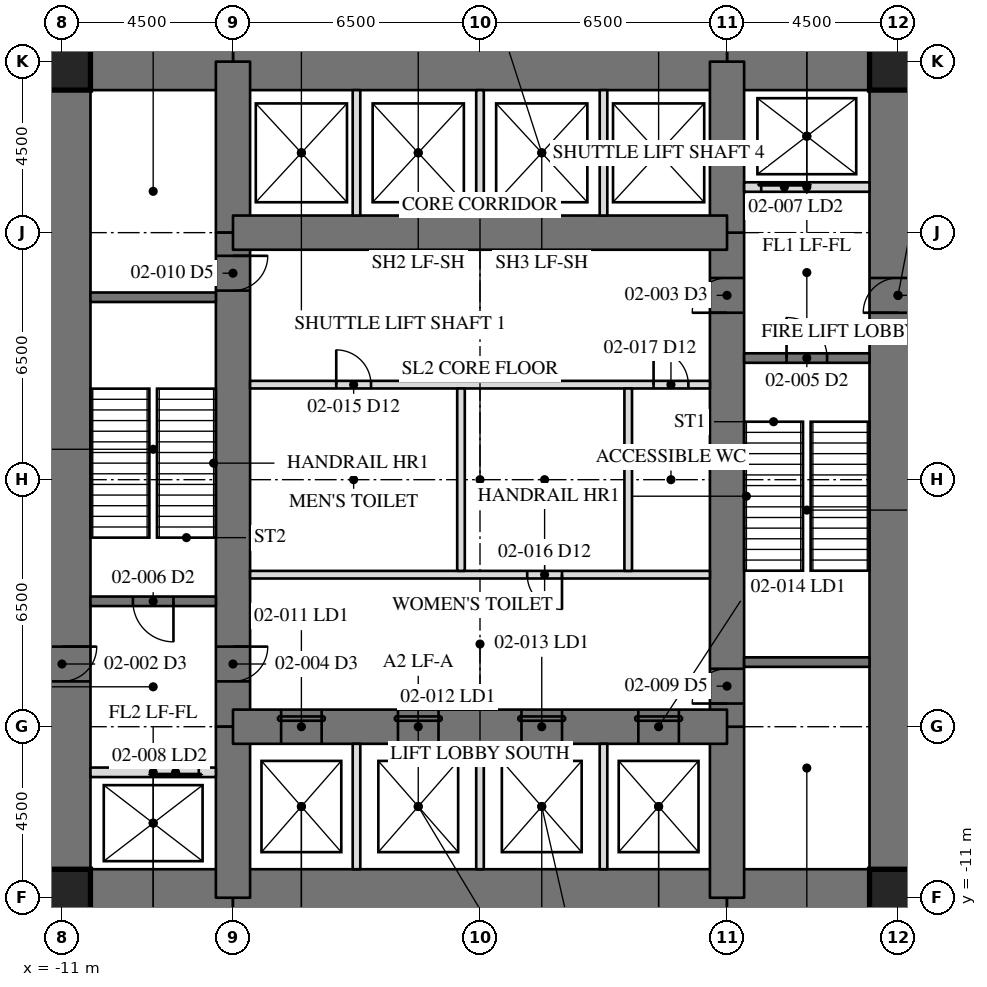
"""IFC4 building model, lengths in metres.
Left out: names, types, materials, properties, quantities, classifications, styles, units other than length and angle.
Written with IfcOpenShell. Run it as: python <this file> out.ifc"""

import sys

from ifc_helpers import new_model, si_unit, direction, frame, frame_2d, origin, origin_2d, place, context, subcontext, project, spatial, rectangle, hollow_rectangle, extrude, element, fill, save


model = new_model("IFC4")
c1 = context("Model", 3, precision=1e-05, world=origin(), true_north=direction((0.0, 1.0)))
c2 = subcontext(c1, "Body", "Model", "MODEL_VIEW")
j1 = project(units=[si_unit("LENGTHUNIT", "METRE"), si_unit("PLANEANGLEUNIT", "RADIAN")], contexts=[c1])
p1 = place(None, origin())
s1 = spatial("IfcSite", under=j1, at=p1, CompositionType="ELEMENT")
p2 = place(p1, origin())
s2 = spatial("IfcBuilding", under=s1, at=p2, CompositionType="ELEMENT")
p3 = place(p2, frame((0.0, 0.0, 11.0)))
s3 = spatial("IfcBuildingStorey", under=s2, at=p3, CompositionType="ELEMENT", Elevation=11.0)
p4 = place(p3, frame((11.0, -11.0, 0.0), z_axis=(0.0, 0.0, 1.0), x_axis=(0.0, 1.0, 0.0)))
e1 = element("IfcWall", 1, at=p4, inside=s3, PredefinedType="SHEAR", context=c2, shape_type="SweptSolid", body=[
    extrude(rectangle(XDim=22.0, YDim=1.5, at=frame_2d((11.0, 0.0))), origin(), (0.0, 0.0, 1.0), 5.0),
])
p5 = place(p4, frame((15.393, 0.0, 0.0)))
e2 = element("IfcOpeningElement", 2, at=p5, cuts=e1, PredefinedType="OPENING", context=c2, shape_type="SweptSolid", body=[
    extrude(rectangle(XDim=0.915, YDim=2.134, at=frame_2d((0.458, 1.067))), frame((0.0, 0.76, 0.0), z_axis=(0.0, -1.0, 0.0), x_axis=(1.0, 0.0, 0.0)), (0.0, 0.0, 1.0), 1.52),
])
p6 = place(p3, frame((-11.0, 11.0, 0.0), z_axis=(0.0, 0.0, 1.0), x_axis=(0.0, -1.0, 0.0)))
e3 = element("IfcWall", 3, at=p6, inside=s3, PredefinedType="SHEAR", context=c2, shape_type="SweptSolid", body=[
    extrude(rectangle(XDim=22.0, YDim=1.5, at=frame_2d((11.0, 0.0))), origin(), (0.0, 0.0, 1.0), 5.0),
])
p7 = place(p6, frame((15.393, 0.0, 0.0)))
e4 = element("IfcOpeningElement", 4, at=p7, cuts=e3, PredefinedType="OPENING", context=c2, shape_type="SweptSolid", body=[
    extrude(rectangle(XDim=0.915, YDim=2.134, at=frame_2d((0.458, 1.067))), frame((0.0, 0.76, 0.0), z_axis=(0.0, -1.0, 0.0), x_axis=(1.0, 0.0, 0.0)), (0.0, 0.0, 1.0), 1.52),
])
p8 = place(p3, frame((11.0, 11.0, 0.0), z_axis=(0.0, 0.0, 1.0), x_axis=(-1.0, 0.0, 0.0)))
e5 = element("IfcWall", 5, at=p8, inside=s3, PredefinedType="SHEAR", context=c2, shape_type="SweptSolid", body=[
    extrude(rectangle(XDim=4.5, YDim=1.5, at=frame_2d((2.25, 0.0))), origin(), (0.0, 0.0, 1.0), 5.0),
])
p9 = place(p3, frame((6.5, 11.0, 0.0), z_axis=(0.0, 0.0, 1.0), x_axis=(-1.0, 0.0, 0.0)))
e6 = element("IfcWall", 6, at=p9, inside=s3, PredefinedType="SHEAR", context=c2, shape_type="SweptSolid", body=[
    extrude(rectangle(XDim=13.0, YDim=1.5, at=frame_2d((6.5, 0.0))), origin(), (0.0, 0.0, 1.0), 5.0),
])
for number, where, z_axis, x_axis in (
    (7, (-6.5, 11.0, 0.0), (0.0, 0.0, 1.0), (-1.0, 0.0, 0.0)),
    (8, (-11.0, -11.0, 0.0), (0.0, 0.0, 1.0), (1.0, 0.0, 0.0)),
):
    element("IfcWall", number, at=place(p3, frame(where, z_axis=z_axis, x_axis=x_axis)), inside=s3, PredefinedType="SHEAR", context=c2, shape_type="SweptSolid", body=[
        extrude(rectangle(XDim=4.5, YDim=1.5, at=frame_2d((2.25, 0.0))), origin(), (0.0, 0.0, 1.0), 5.0),
    ])
p10 = place(p3, frame((-6.5, -11.0, 0.0), z_axis=(0.0, 0.0, 1.0), x_axis=(1.0, 0.0, 0.0)))
e9 = element("IfcWall", 9, at=p10, inside=s3, PredefinedType="SHEAR", context=c2, shape_type="SweptSolid", body=[
    extrude(rectangle(XDim=13.0, YDim=1.5, at=frame_2d((6.5, 0.0))), origin(), (0.0, 0.0, 1.0), 5.0),
])
p11 = place(p3, frame((6.5, -11.0, 0.0), z_axis=(0.0, 0.0, 1.0), x_axis=(1.0, 0.0, 0.0)))
e10 = element("IfcWall", 10, at=p11, inside=s3, PredefinedType="SHEAR", context=c2, shape_type="SweptSolid", body=[
    extrude(rectangle(XDim=4.5, YDim=1.5, at=frame_2d((2.25, 0.0))), origin(), (0.0, 0.0, 1.0), 5.0),
])
p12 = place(p3, frame((6.5, -11.0, 0.0), z_axis=(0.0, 0.0, 1.0), x_axis=(0.0, 1.0, 0.0)))
e11 = element("IfcWall", 11, at=p12, inside=s3, PredefinedType="SHEAR", context=c2, shape_type="SweptSolid", body=[
    extrude(rectangle(XDim=4.5, YDim=0.9, at=frame_2d((2.25, 0.0))), origin(), (0.0, 0.0, 1.0), 5.0),
])
p13 = place(p3, frame((6.5, -6.5, 0.0), z_axis=(0.0, 0.0, 1.0), x_axis=(0.0, 1.0, 0.0)))
e12 = element("IfcWall", 12, at=p13, inside=s3, PredefinedType="SHEAR", context=c2, shape_type="SweptSolid", body=[
    extrude(rectangle(XDim=13.0, YDim=0.9, at=frame_2d((6.5, 0.0))), origin(), (0.0, 0.0, 1.0), 5.0),
])
p14 = place(p13, frame((10.893, 0.0, 0.0)))
e13 = element("IfcOpeningElement", 13, at=p14, cuts=e12, PredefinedType="OPENING", context=c2, shape_type="SweptSolid", body=[
    extrude(rectangle(XDim=0.915, YDim=2.134, at=frame_2d((0.458, 1.067))), frame((0.0, 0.46, 0.0), z_axis=(0.0, -1.0, 0.0), x_axis=(1.0, 0.0, 0.0)), (0.0, 0.0, 1.0), 0.92),
])
p15 = place(p13, frame((0.61, 0.0, 0.0)))
e14 = element("IfcOpeningElement", 14, at=p15, cuts=e12, PredefinedType="OPENING", context=c2, shape_type="SweptSolid", body=[
    extrude(rectangle(XDim=0.915, YDim=2.134, at=frame_2d((0.458, 1.067))), frame((0.0, 0.46, 0.0), z_axis=(0.0, -1.0, 0.0), x_axis=(1.0, 0.0, 0.0)), (0.0, 0.0, 1.0), 0.92),
])
for number, where, z_axis, x_axis in (
    (15, (6.5, 6.5, 0.0), (0.0, 0.0, 1.0), (0.0, 1.0, 0.0)),
    (16, (-6.5, 11.0, 0.0), (0.0, 0.0, 1.0), (0.0, -1.0, 0.0)),
):
    element("IfcWall", number, at=place(p3, frame(where, z_axis=z_axis, x_axis=x_axis)), inside=s3, PredefinedType="SHEAR", context=c2, shape_type="SweptSolid", body=[
        extrude(rectangle(XDim=4.5, YDim=0.9, at=frame_2d((2.25, 0.0))), origin(), (0.0, 0.0, 1.0), 5.0),
    ])
p16 = place(p3, frame((-6.5, 6.5, 0.0), z_axis=(0.0, 0.0, 1.0), x_axis=(0.0, -1.0, 0.0)))
e17 = element("IfcWall", 17, at=p16, inside=s3, PredefinedType="SHEAR", context=c2, shape_type="SweptSolid", body=[
    extrude(rectangle(XDim=13.0, YDim=0.9, at=frame_2d((6.5, 0.0))), origin(), (0.0, 0.0, 1.0), 5.0),
])
p17 = place(p16, frame((10.893, 0.0, 0.0)))
e18 = element("IfcOpeningElement", 18, at=p17, cuts=e17, PredefinedType="OPENING", context=c2, shape_type="SweptSolid", body=[
    extrude(rectangle(XDim=0.915, YDim=2.134, at=frame_2d((0.458, 1.067))), frame((0.0, 0.46, 0.0), z_axis=(0.0, -1.0, 0.0), x_axis=(1.0, 0.0, 0.0)), (0.0, 0.0, 1.0), 0.92),
])
p18 = place(p16, frame((0.61, 0.0, 0.0)))
e19 = element("IfcOpeningElement", 19, at=p18, cuts=e17, PredefinedType="OPENING", context=c2, shape_type="SweptSolid", body=[
    extrude(rectangle(XDim=0.915, YDim=2.134, at=frame_2d((0.458, 1.067))), frame((0.0, 0.46, 0.0), z_axis=(0.0, -1.0, 0.0), x_axis=(1.0, 0.0, 0.0)), (0.0, 0.0, 1.0), 0.92),
])
p19 = place(p3, frame((-6.5, -6.5, 0.0), z_axis=(0.0, 0.0, 1.0), x_axis=(0.0, -1.0, 0.0)))
e20 = element("IfcWall", 20, at=p19, inside=s3, PredefinedType="SHEAR", context=c2, shape_type="SweptSolid", body=[
    extrude(rectangle(XDim=4.5, YDim=0.9, at=frame_2d((2.25, 0.0))), origin(), (0.0, 0.0, 1.0), 5.0),
])
p20 = place(p3, frame((6.5, 6.5, 0.0), z_axis=(0.0, 0.0, 1.0), x_axis=(-1.0, 0.0, 0.0)))
e21 = element("IfcWall", 21, at=p20, inside=s3, PredefinedType="SHEAR", context=c2, shape_type="SweptSolid", body=[
    extrude(rectangle(XDim=13.0, YDim=0.9, at=frame_2d((6.5, 0.0))), origin(), (0.0, 0.0, 1.0), 5.0),
])
p21 = place(p3, frame((-6.5, -6.5, 0.0), z_axis=(0.0, 0.0, 1.0), x_axis=(1.0, 0.0, 0.0)))
e22 = element("IfcWall", 22, at=p21, inside=s3, PredefinedType="SHEAR", context=c2, shape_type="SweptSolid", body=[
    extrude(rectangle(XDim=13.0, YDim=0.9, at=frame_2d((6.5, 0.0))), origin(), (0.0, 0.0, 1.0), 5.0),
])
p22 = place(p21, frame((1.267, 0.0, 0.0)))
e23 = element("IfcOpeningElement", 23, at=p22, cuts=e22, PredefinedType="OPENING", context=c2, shape_type="SweptSolid", body=[
    extrude(rectangle(XDim=1.067, YDim=2.134, at=frame_2d((0.533, 1.067))), frame((0.0, 0.46, 0.0), z_axis=(0.0, -1.0, 0.0), x_axis=(1.0, 0.0, 0.0)), (0.0, 0.0, 1.0), 0.92),
])
p23 = place(p21, frame((4.342, 0.0, 0.0)))
e24 = element("IfcOpeningElement", 24, at=p23, cuts=e22, PredefinedType="OPENING", context=c2, shape_type="SweptSolid", body=[
    extrude(rectangle(XDim=1.067, YDim=2.134, at=frame_2d((0.533, 1.067))), frame((0.0, 0.46, 0.0), z_axis=(0.0, -1.0, 0.0), x_axis=(1.0, 0.0, 0.0)), (0.0, 0.0, 1.0), 0.92),
])
p24 = place(p21, frame((7.592, 0.0, 0.0)))
e25 = element("IfcOpeningElement", 25, at=p24, cuts=e22, PredefinedType="OPENING", context=c2, shape_type="SweptSolid", body=[
    extrude(rectangle(XDim=1.067, YDim=2.134, at=frame_2d((0.533, 1.067))), frame((0.0, 0.46, 0.0), z_axis=(0.0, -1.0, 0.0), x_axis=(1.0, 0.0, 0.0)), (0.0, 0.0, 1.0), 0.92),
])
p25 = place(p21, frame((10.667, 0.0, 0.0)))
e26 = element("IfcOpeningElement", 26, at=p25, cuts=e22, PredefinedType="OPENING", context=c2, shape_type="SweptSolid", body=[
    extrude(rectangle(XDim=1.067, YDim=2.134, at=frame_2d((0.533, 1.067))), frame((0.0, 0.46, 0.0), z_axis=(0.0, -1.0, 0.0), x_axis=(1.0, 0.0, 0.0)), (0.0, 0.0, 1.0), 0.92),
])
for number, where, z_axis, x_axis in (
    (27, (11.0, 11.0, 0.0), (0.0, 0.0, 1.0), (1.0, 0.0, 0.0)),
    (28, (-11.0, 11.0, 0.0), (0.0, 0.0, 1.0), (1.0, 0.0, 0.0)),
    (29, (-11.0, -11.0, 0.0), (0.0, 0.0, 1.0), (1.0, 0.0, 0.0)),
    (30, (11.0, -11.0, 0.0), (0.0, 0.0, 1.0), (1.0, 0.0, 0.0)),
):
    element("IfcColumn", number, at=place(p3, frame(where, z_axis=z_axis, x_axis=x_axis)), inside=s3, PredefinedType="COLUMN", context=c2, shape_type="SweptSolid", body=[
        extrude(hollow_rectangle(XDim=1.499, YDim=1.499, WallThickness=0.102, at=origin_2d()), origin(), (0.0, 0.0, 1.0), 5.0),
    ])
for number, where, z_axis, x_axis in (
    (31, (6.95, -4.8, 0.0), (0.0, 0.0, 1.0), (1.0, 0.0, 0.0)),
    (32, (-6.95, 4.8, 0.0), (0.0, 0.0, 1.0), (-1.0, 0.0, 0.0)),
):
    element("IfcWall", number, at=place(p3, frame(where, z_axis=z_axis, x_axis=x_axis)), inside=s3, PredefinedType="SOLIDWALL", context=c2, shape_type="SweptSolid", body=[
        extrude(rectangle(XDim=3.3, YDim=0.25, at=frame_2d((1.65, 0.0))), origin(), (0.0, 0.0, 1.0), 4.81),
    ])
p26 = place(p3, frame((6.95, 3.2, 0.0), z_axis=(0.0, 0.0, 1.0), x_axis=(1.0, 0.0, 0.0)))
e33 = element("IfcWall", 33, at=p26, inside=s3, PredefinedType="SOLIDWALL", context=c2, shape_type="SweptSolid", body=[
    extrude(rectangle(XDim=3.3, YDim=0.25, at=frame_2d((1.65, 0.0))), origin(), (0.0, 0.0, 1.0), 4.81),
])
p27 = place(p26, frame((1.116, 0.0, 0.0)))
e34 = element("IfcOpeningElement", 34, at=p27, cuts=e33, PredefinedType="OPENING", context=c2, shape_type="SweptSolid", body=[
    extrude(rectangle(XDim=1.067, YDim=2.134, at=frame_2d((0.533, 1.067))), frame((0.0, 0.135, 0.0), z_axis=(0.0, -1.0, 0.0), x_axis=(1.0, 0.0, 0.0)), (0.0, 0.0, 1.0), 0.27),
])
p28 = place(p3, frame((-6.95, -3.2, 0.0), z_axis=(0.0, 0.0, 1.0), x_axis=(-1.0, 0.0, 0.0)))
e35 = element("IfcWall", 35, at=p28, inside=s3, PredefinedType="SOLIDWALL", context=c2, shape_type="SweptSolid", body=[
    extrude(rectangle(XDim=3.3, YDim=0.25, at=frame_2d((1.65, 0.0))), origin(), (0.0, 0.0, 1.0), 4.81),
])
p29 = place(p28, frame((1.116, 0.0, 0.0)))
e36 = element("IfcOpeningElement", 36, at=p29, cuts=e35, PredefinedType="OPENING", context=c2, shape_type="SweptSolid", body=[
    extrude(rectangle(XDim=1.067, YDim=2.134, at=frame_2d((0.533, 1.067))), frame((0.0, 0.135, 0.0), z_axis=(0.0, -1.0, 0.0), x_axis=(1.0, 0.0, 0.0)), (0.0, 0.0, 1.0), 0.27),
])
p30 = place(p3, frame((6.95, 7.7, 0.0), z_axis=(0.0, 0.0, 1.0), x_axis=(1.0, 0.0, 0.0)))
e37 = element("IfcWall", 37, at=p30, inside=s3, PredefinedType="PARTITIONING", context=c2, shape_type="SweptSolid", body=[
    extrude(rectangle(XDim=3.3, YDim=0.25, at=frame_2d((1.65, 0.0))), origin(), (0.0, 0.0, 1.0), 4.81),
])
p31 = place(p30, frame((0.45, 0.0, 0.0)))
e38 = element("IfcOpeningElement", 38, at=p31, cuts=e37, PredefinedType="OPENING", context=c2, shape_type="SweptSolid", body=[
    extrude(rectangle(XDim=1.219, YDim=2.134, at=frame_2d((0.609, 1.067))), frame((0.0, 0.135, 0.0), z_axis=(0.0, -1.0, 0.0), x_axis=(1.0, 0.0, 0.0)), (0.0, 0.0, 1.0), 0.27),
])
p32 = place(p3, frame((-6.95, -7.7, 0.0), z_axis=(0.0, 0.0, 1.0), x_axis=(-1.0, 0.0, 0.0)))
e39 = element("IfcWall", 39, at=p32, inside=s3, PredefinedType="PARTITIONING", context=c2, shape_type="SweptSolid", body=[
    extrude(rectangle(XDim=3.3, YDim=0.25, at=frame_2d((1.65, 0.0))), origin(), (0.0, 0.0, 1.0), 4.81),
])
p33 = place(p32, frame((0.45, 0.0, 0.0)))
e40 = element("IfcOpeningElement", 40, at=p33, cuts=e39, PredefinedType="OPENING", context=c2, shape_type="SweptSolid", body=[
    extrude(rectangle(XDim=1.219, YDim=2.134, at=frame_2d((0.609, 1.067))), frame((0.0, 0.135, 0.0), z_axis=(0.0, -1.0, 0.0), x_axis=(1.0, 0.0, 0.0)), (0.0, 0.0, 1.0), 0.27),
])
p34 = place(p3, frame((-6.05, 2.5, 0.0), z_axis=(0.0, 0.0, 1.0), x_axis=(1.0, 0.0, 0.0)))
e41 = element("IfcWall", 41, at=p34, inside=s3, PredefinedType="PARTITIONING", context=c2, shape_type="SweptSolid", body=[
    extrude(rectangle(XDim=12.1, YDim=0.2, at=frame_2d((6.05, 0.0))), origin(), (0.0, 0.0, 1.0), 4.81),
])
p35 = place(p34, frame((2.268, 0.0, 0.0)))
e42 = element("IfcOpeningElement", 42, at=p35, cuts=e41, PredefinedType="OPENING", context=c2, shape_type="SweptSolid", body=[
    extrude(rectangle(XDim=0.915, YDim=2.134, at=frame_2d((0.458, 1.067))), frame((0.0, 0.11, 0.0), z_axis=(0.0, -1.0, 0.0), x_axis=(1.0, 0.0, 0.0)), (0.0, 0.0, 1.0), 0.22),
])
p36 = place(p34, frame((10.617, 0.0, 0.0)))
e43 = element("IfcOpeningElement", 43, at=p36, cuts=e41, PredefinedType="OPENING", context=c2, shape_type="SweptSolid", body=[
    extrude(rectangle(XDim=0.915, YDim=2.134, at=frame_2d((0.458, 1.067))), frame((0.0, 0.11, 0.0), z_axis=(0.0, -1.0, 0.0), x_axis=(1.0, 0.0, 0.0)), (0.0, 0.0, 1.0), 0.22),
])
p37 = place(p3, frame((6.05, -2.5, 0.0), z_axis=(0.0, 0.0, 1.0), x_axis=(-1.0, 0.0, 0.0)))
e44 = element("IfcWall", 44, at=p37, inside=s3, PredefinedType="PARTITIONING", context=c2, shape_type="SweptSolid", body=[
    extrude(rectangle(XDim=12.1, YDim=0.2, at=frame_2d((6.05, 0.0))), origin(), (0.0, 0.0, 1.0), 4.81),
])
p38 = place(p37, frame((3.893, 0.0, 0.0)))
e45 = element("IfcOpeningElement", 45, at=p38, cuts=e44, PredefinedType="OPENING", context=c2, shape_type="SweptSolid", body=[
    extrude(rectangle(XDim=0.915, YDim=2.134, at=frame_2d((0.458, 1.067))), frame((0.0, 0.11, 0.0), z_axis=(0.0, -1.0, 0.0), x_axis=(1.0, 0.0, 0.0)), (0.0, 0.0, 1.0), 0.22),
])
for number, where, z_axis, x_axis in (
    (46, (-3.25, 6.95, 0.0), (0.0, 0.0, 1.0), (0.0, 1.0, 0.0)),
    (47, (0.0, 6.95, 0.0), (0.0, 0.0, 1.0), (0.0, 1.0, 0.0)),
    (48, (3.25, 6.95, 0.0), (0.0, 0.0, 1.0), (0.0, 1.0, 0.0)),
    (49, (-3.25, -10.25, 0.0), (0.0, 0.0, 1.0), (0.0, 1.0, 0.0)),
    (50, (0.0, -10.25, 0.0), (0.0, 0.0, 1.0), (0.0, 1.0, 0.0)),
    (51, (3.25, -10.25, 0.0), (0.0, 0.0, 1.0), (0.0, 1.0, 0.0)),
):
    element("IfcWall", number, at=place(p3, frame(where, z_axis=z_axis, x_axis=x_axis)), inside=s3, PredefinedType="PARTITIONING", context=c2, shape_type="SweptSolid", body=[
        extrude(rectangle(XDim=3.3, YDim=0.2, at=frame_2d((1.65, 0.0))), origin(), (0.0, 0.0, 1.0), 4.81),
    ])
for number, where, z_axis, x_axis in (
    (52, (-0.5, -2.4, 0.0), (0.0, 0.0, 1.0), (0.0, 1.0, 0.0)),
    (53, (3.9, -2.4, 0.0), (0.0, 0.0, 1.0), (0.0, 1.0, 0.0)),
):
    element("IfcWall", number, at=place(p3, frame(where, z_axis=z_axis, x_axis=x_axis)), inside=s3, PredefinedType="PARTITIONING", context=c2, shape_type="SweptSolid", body=[
        extrude(rectangle(XDim=4.8, YDim=0.2, at=frame_2d((2.4, 0.0))), origin(), (0.0, 0.0, 1.0), 4.81),
    ])
p39 = place(p14, origin())
e54 = element("IfcDoor", 54, at=p39, inside=s3, OperationType="SINGLE_SWING_RIGHT", PredefinedType="DOOR", context=c2, shape_type="SweptSolid", body=[
    extrude(rectangle(XDim=0.915, YDim=2.134, at=frame_2d((0.458, 1.067))), frame((0.0, -0.375, 0.0), z_axis=(0.0, -1.0, 0.0), x_axis=(1.0, 0.0, 0.0)), (0.0, 0.0, 1.0), 0.05),
])
fill(e13, e54)
p40 = place(p17, origin())
e55 = element("IfcDoor", 55, at=p40, inside=s3, OperationType="SINGLE_SWING_RIGHT", PredefinedType="DOOR", context=c2, shape_type="SweptSolid", body=[
    extrude(rectangle(XDim=0.915, YDim=2.134, at=frame_2d((0.458, 1.067))), frame((0.0, -0.375, 0.0), z_axis=(0.0, -1.0, 0.0), x_axis=(1.0, 0.0, 0.0)), (0.0, 0.0, 1.0), 0.05),
])
fill(e18, e55)
p41 = place(p27, origin())
e56 = element("IfcDoor", 56, at=p41, inside=s3, OperationType="SINGLE_SWING_LEFT", PredefinedType="DOOR", context=c2, shape_type="SweptSolid", body=[
    extrude(rectangle(XDim=1.067, YDim=2.134, at=frame_2d((0.533, 1.067))), frame((0.0, 0.025, 0.0), z_axis=(0.0, -1.0, 0.0), x_axis=(1.0, 0.0, 0.0)), (0.0, 0.0, 1.0), 0.05),
])
fill(e34, e56)
p42 = place(p29, origin())
e57 = element("IfcDoor", 57, at=p42, inside=s3, OperationType="SINGLE_SWING_LEFT", PredefinedType="DOOR", context=c2, shape_type="SweptSolid", body=[
    extrude(rectangle(XDim=1.067, YDim=2.134, at=frame_2d((0.533, 1.067))), frame((0.0, 0.025, 0.0), z_axis=(0.0, -1.0, 0.0), x_axis=(1.0, 0.0, 0.0)), (0.0, 0.0, 1.0), 0.05),
])
fill(e36, e57)
p43 = place(p31, origin())
e58 = element("IfcDoor", 58, at=p43, inside=s3, OperationType="SLIDING_TO_LEFT", PredefinedType="DOOR", context=c2, shape_type="SweptSolid", body=[
    extrude(rectangle(XDim=1.219, YDim=2.134, at=frame_2d((0.609, 1.067))), frame((0.0, 0.025, 0.0), z_axis=(0.0, -1.0, 0.0), x_axis=(1.0, 0.0, 0.0)), (0.0, 0.0, 1.0), 0.05),
])
fill(e38, e58)
p44 = place(p33, origin())
e59 = element("IfcDoor", 59, at=p44, inside=s3, OperationType="SLIDING_TO_LEFT", PredefinedType="DOOR", context=c2, shape_type="SweptSolid", body=[
    extrude(rectangle(XDim=1.219, YDim=2.134, at=frame_2d((0.609, 1.067))), frame((0.0, 0.025, 0.0), z_axis=(0.0, -1.0, 0.0), x_axis=(1.0, 0.0, 0.0)), (0.0, 0.0, 1.0), 0.05),
])
fill(e40, e59)
p45 = place(p15, origin())
e60 = element("IfcDoor", 60, at=p45, inside=s3, OperationType="SINGLE_SWING_RIGHT", PredefinedType="DOOR", context=c2, shape_type="SweptSolid", body=[
    extrude(rectangle(XDim=0.915, YDim=2.134, at=frame_2d((0.458, 1.067))), frame((0.0, -0.375, 0.0), z_axis=(0.0, -1.0, 0.0), x_axis=(1.0, 0.0, 0.0)), (0.0, 0.0, 1.0), 0.05),
])
fill(e14, e60)
p46 = place(p18, origin())
e61 = element("IfcDoor", 61, at=p46, inside=s3, OperationType="SINGLE_SWING_RIGHT", PredefinedType="DOOR", context=c2, shape_type="SweptSolid", body=[
    extrude(rectangle(XDim=0.915, YDim=2.134, at=frame_2d((0.458, 1.067))), frame((0.0, -0.375, 0.0), z_axis=(0.0, -1.0, 0.0), x_axis=(1.0, 0.0, 0.0)), (0.0, 0.0, 1.0), 0.05),
])
fill(e19, e61)
p47 = place(p22, origin())
e62 = element("IfcDoor", 62, at=p47, inside=s3, OperationType="SLIDING_TO_LEFT", PredefinedType="DOOR", context=c2, shape_type="SweptSolid", body=[
    extrude(rectangle(XDim=1.067, YDim=2.134, at=frame_2d((0.533, 1.067))), frame((0.0, -0.375, 0.0), z_axis=(0.0, -1.0, 0.0), x_axis=(1.0, 0.0, 0.0)), (0.0, 0.0, 1.0), 0.05),
])
fill(e23, e62)
p48 = place(p23, origin())
e63 = element("IfcDoor", 63, at=p48, inside=s3, OperationType="SLIDING_TO_LEFT", PredefinedType="DOOR", context=c2, shape_type="SweptSolid", body=[
    extrude(rectangle(XDim=1.067, YDim=2.134, at=frame_2d((0.533, 1.067))), frame((0.0, -0.375, 0.0), z_axis=(0.0, -1.0, 0.0), x_axis=(1.0, 0.0, 0.0)), (0.0, 0.0, 1.0), 0.05),
])
fill(e24, e63)
p49 = place(p24, origin())
e64 = element("IfcDoor", 64, at=p49, inside=s3, OperationType="SLIDING_TO_LEFT", PredefinedType="DOOR", context=c2, shape_type="SweptSolid", body=[
    extrude(rectangle(XDim=1.067, YDim=2.134, at=frame_2d((0.533, 1.067))), frame((0.0, -0.375, 0.0), z_axis=(0.0, -1.0, 0.0), x_axis=(1.0, 0.0, 0.0)), (0.0, 0.0, 1.0), 0.05),
])
fill(e25, e64)
p50 = place(p25, origin())
e65 = element("IfcDoor", 65, at=p50, inside=s3, OperationType="SLIDING_TO_LEFT", PredefinedType="DOOR", context=c2, shape_type="SweptSolid", body=[
    extrude(rectangle(XDim=1.067, YDim=2.134, at=frame_2d((0.533, 1.067))), frame((0.0, -0.375, 0.0), z_axis=(0.0, -1.0, 0.0), x_axis=(1.0, 0.0, 0.0)), (0.0, 0.0, 1.0), 0.05),
])
fill(e26, e65)
p51 = place(p35, origin())
e66 = element("IfcDoor", 66, at=p51, inside=s3, OperationType="SINGLE_SWING_LEFT", PredefinedType="DOOR", context=c2, shape_type="SweptSolid", body=[
    extrude(rectangle(XDim=0.915, YDim=2.134, at=frame_2d((0.458, 1.067))), frame((0.0, 0.025, 0.0), z_axis=(0.0, -1.0, 0.0), x_axis=(1.0, 0.0, 0.0)), (0.0, 0.0, 1.0), 0.05),
])
fill(e42, e66)
p52 = place(p38, origin())
e67 = element("IfcDoor", 67, at=p52, inside=s3, OperationType="SINGLE_SWING_LEFT", PredefinedType="DOOR", context=c2, shape_type="SweptSolid", body=[
    extrude(rectangle(XDim=0.915, YDim=2.134, at=frame_2d((0.458, 1.067))), frame((0.0, 0.025, 0.0), z_axis=(0.0, -1.0, 0.0), x_axis=(1.0, 0.0, 0.0)), (0.0, 0.0, 1.0), 0.05),
])
fill(e45, e67)
p53 = place(p36, origin())
e68 = element("IfcDoor", 68, at=p53, inside=s3, OperationType="SINGLE_SWING_LEFT", PredefinedType="DOOR", context=c2, shape_type="SweptSolid", body=[
    extrude(rectangle(XDim=0.915, YDim=2.134, at=frame_2d((0.458, 1.067))), frame((0.0, 0.025, 0.0), z_axis=(0.0, -1.0, 0.0), x_axis=(1.0, 0.0, 0.0)), (0.0, 0.0, 1.0), 0.05),
])
fill(e43, e68)
save(model, sys.argv[1])
